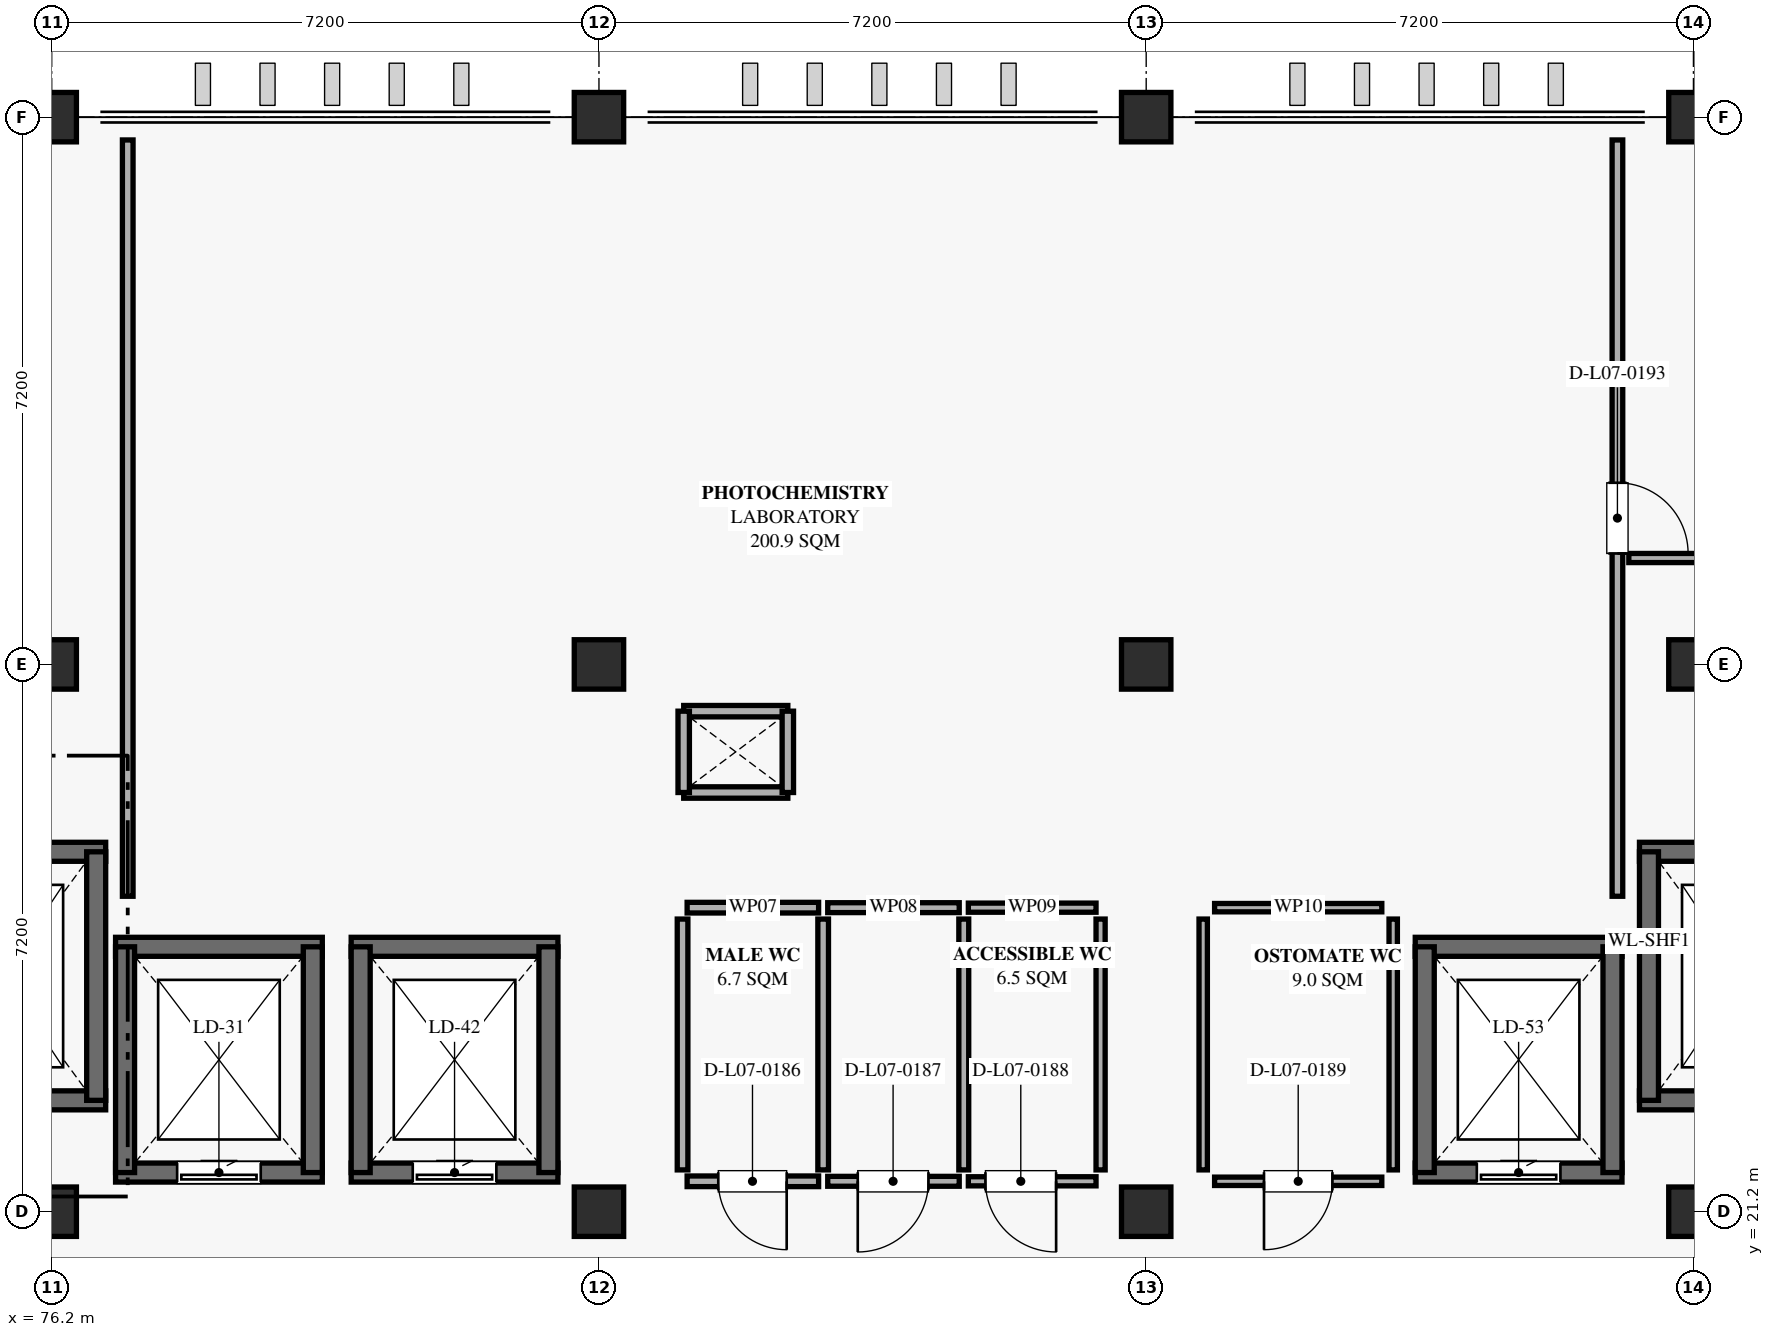
"""IFC4 building model, lengths in metres.
Left out: names, types, materials, properties, quantities, classifications, styles, units other than length and angle.
Written with IfcOpenShell. Run it as: python <this file> out.ifc"""

import sys

from ifc_helpers import new_model, si_unit, direction, frame, frame_2d, origin, origin_2d, place, context, subcontext, project, spatial, rectangle, extrude, element, fill, save


model = new_model("IFC4")
c1 = context("Model", 3, precision=1e-05, world=origin(), true_north=direction((0.0, 1.0)))
c2 = subcontext(c1, "Body", "Model", "MODEL_VIEW")
j1 = project(units=[si_unit("LENGTHUNIT", "METRE"), si_unit("PLANEANGLEUNIT", "RADIAN")], contexts=[c1])
p1 = place(None, origin())
s1 = spatial("IfcSite", under=j1, at=p1, CompositionType="ELEMENT")
p2 = place(p1, origin())
s2 = spatial("IfcBuilding", under=s1, at=p2, CompositionType="ELEMENT")
p3 = place(p2, frame((0.0, 0.0, 33.3)))
s3 = spatial("IfcBuildingStorey", under=s2, at=p3, CompositionType="ELEMENT", Elevation=33.3)
for number, where, z_axis, x_axis in (
    (1, (76.2, 21.2, 0.0), (0.0, 0.0, 1.0), (1.0, 0.0, 0.0)),
    (2, (83.4, 21.2, 0.0), (0.0, 0.0, 1.0), (1.0, 0.0, 0.0)),
    (3, (90.6, 21.2, 0.0), (0.0, 0.0, 1.0), (1.0, 0.0, 0.0)),
    (4, (97.8, 21.2, 0.0), (0.0, 0.0, 1.0), (1.0, 0.0, 0.0)),
    (5, (76.2, 28.4, 0.0), (0.0, 0.0, 1.0), (1.0, 0.0, 0.0)),
    (6, (83.4, 28.4, 0.0), (0.0, 0.0, 1.0), (1.0, 0.0, 0.0)),
    (7, (90.6, 28.4, 0.0), (0.0, 0.0, 1.0), (1.0, 0.0, 0.0)),
    (8, (97.8, 28.4, 0.0), (0.0, 0.0, 1.0), (1.0, 0.0, 0.0)),
    (9, (76.2, 35.6, 0.0), (0.0, 0.0, 1.0), (1.0, 0.0, 0.0)),
    (10, (83.4, 35.6, 0.0), (0.0, 0.0, 1.0), (1.0, 0.0, 0.0)),
    (11, (90.6, 35.6, 0.0), (0.0, 0.0, 1.0), (1.0, 0.0, 0.0)),
    (12, (97.8, 35.6, 0.0), (0.0, 0.0, 1.0), (1.0, 0.0, 0.0)),
):
    element("IfcColumn", number, at=place(p3, frame(where, z_axis=z_axis, x_axis=x_axis)), inside=s3, PredefinedType="COLUMN", context=c2, shape_type="SweptSolid", body=[
        extrude(rectangle(XDim=0.65, YDim=0.65, at=origin_2d()), origin(), (0.0, 0.0, 1.0), 4.32),
    ])
for number, where, z_axis, x_axis in (
    (13, (85.885, 26.715, 0.0), (0.0, 0.0, 1.0), (-1.0, 0.0, 0.0)),
    (14, (84.515, 27.785, 0.0), (0.0, 0.0, 1.0), (1.0, 0.0, 0.0)),
):
    element("IfcWall", number, at=place(p3, frame(where, z_axis=z_axis, x_axis=x_axis)), inside=s3, PredefinedType="PARTITIONING", context=c2, shape_type="SweptSolid", body=[
        extrude(rectangle(XDim=1.37, YDim=0.15, at=frame_2d((0.685, 0.0))), origin(), (0.0, 0.0, 1.0), 2.8),
    ])
for number, where, z_axis, x_axis in (
    (15, (84.515, 26.715, 0.0), (0.0, 0.0, 1.0), (0.0, 1.0, 0.0)),
    (16, (85.885, 27.785, 0.0), (0.0, 0.0, 1.0), (0.0, -1.0, 0.0)),
):
    element("IfcWall", number, at=place(p3, frame(where, z_axis=z_axis, x_axis=x_axis)), inside=s3, PredefinedType="PARTITIONING", context=c2, shape_type="SweptSolid", body=[
        extrude(rectangle(XDim=1.07, YDim=0.15, at=frame_2d((0.535, 0.0))), origin(), (0.0, 0.0, 1.0), 2.8),
    ])
for number, where, z_axis, x_axis in (
    (17, (76.91, 22.665, 0.0), (0.0, 0.0, 1.0), (-1.0, 0.0, 0.0)),
    (18, (74.19, 25.935, 0.0), (0.0, 0.0, 1.0), (1.0, 0.0, 0.0)),
):
    element("IfcWall", number, at=place(p3, frame(where, z_axis=z_axis, x_axis=x_axis)), inside=s3, PredefinedType="SHEAR", context=c2, shape_type="SweptSolid", body=[
        extrude(rectangle(XDim=2.72, YDim=0.25, at=frame_2d((1.36, 0.0))), origin(), (0.0, 0.0, 1.0), 4.05),
    ])
p4 = place(p3, frame((76.785, 25.935, 0.0), z_axis=(0.0, 0.0, 1.0), x_axis=(0.0, -1.0, 0.0)))
e19 = element("IfcWall", 19, at=p4, inside=s3, PredefinedType="SHEAR", context=c2, shape_type="SweptSolid", body=[
    extrude(rectangle(XDim=3.27, YDim=0.25, at=frame_2d((1.635, 0.0))), origin(), (0.0, 0.0, 1.0), 4.05),
])
for number, where, z_axis, x_axis in (
    (20, (99.81, 22.665, 0.0), (0.0, 0.0, 1.0), (-1.0, 0.0, 0.0)),
    (21, (97.09, 25.935, 0.0), (0.0, 0.0, 1.0), (1.0, 0.0, 0.0)),
):
    element("IfcWall", number, at=place(p3, frame(where, z_axis=z_axis, x_axis=x_axis)), inside=s3, PredefinedType="SHEAR", context=c2, shape_type="SweptSolid", body=[
        extrude(rectangle(XDim=2.72, YDim=0.25, at=frame_2d((1.36, 0.0))), origin(), (0.0, 0.0, 1.0), 4.05),
    ])
p5 = place(p3, frame((97.215, 22.665, 0.0), z_axis=(0.0, 0.0, 1.0), x_axis=(0.0, 1.0, 0.0)))
e22 = element("IfcWall", 22, at=p5, inside=s3, PredefinedType="SHEAR", context=c2, shape_type="SweptSolid", body=[
    extrude(rectangle(XDim=3.27, YDim=0.25, at=frame_2d((1.635, 0.0))), origin(), (0.0, 0.0, 1.0), 4.05),
])
p6 = place(p3, frame((79.76, 21.715, 0.0), z_axis=(0.0, 0.0, 1.0), x_axis=(-1.0, 0.0, 0.0)))
e23 = element("IfcWall", 23, at=p6, inside=s3, PredefinedType="SHEAR", context=c2, shape_type="SweptSolid", body=[
    extrude(rectangle(XDim=2.72, YDim=0.25, at=frame_2d((1.36, 0.0))), origin(), (0.0, 0.0, 1.0), 4.05),
])
p7 = place(p6, frame((0.81, 0.0, 0.0)))
e24 = element("IfcOpeningElement", 24, at=p7, cuts=e23, PredefinedType="OPENING", context=c2, shape_type="SweptSolid", body=[
    extrude(rectangle(XDim=1.1, YDim=2.2, at=frame_2d((0.55, 1.1))), frame((0.0, 0.135, 0.0), z_axis=(0.0, -1.0, 0.0), x_axis=(1.0, 0.0, 0.0)), (0.0, 0.0, 1.0), 0.27),
])
p8 = place(p3, frame((77.04, 24.685, 0.0), z_axis=(0.0, 0.0, 1.0), x_axis=(1.0, 0.0, 0.0)))
e25 = element("IfcWall", 25, at=p8, inside=s3, PredefinedType="SHEAR", context=c2, shape_type="SweptSolid", body=[
    extrude(rectangle(XDim=2.72, YDim=0.25, at=frame_2d((1.36, 0.0))), origin(), (0.0, 0.0, 1.0), 4.05),
])
for number, where, z_axis, x_axis in (
    (26, (77.165, 21.715, 0.0), (0.0, 0.0, 1.0), (0.0, 1.0, 0.0)),
    (27, (79.635, 24.685, 0.0), (0.0, 0.0, 1.0), (0.0, -1.0, 0.0)),
):
    element("IfcWall", number, at=place(p3, frame(where, z_axis=z_axis, x_axis=x_axis)), inside=s3, PredefinedType="SHEAR", context=c2, shape_type="SweptSolid", body=[
        extrude(rectangle(XDim=2.97, YDim=0.25, at=frame_2d((1.485, 0.0))), origin(), (0.0, 0.0, 1.0), 4.05),
    ])
p9 = place(p3, frame((82.86, 21.715, 0.0), z_axis=(0.0, 0.0, 1.0), x_axis=(-1.0, 0.0, 0.0)))
e28 = element("IfcWall", 28, at=p9, inside=s3, PredefinedType="SHEAR", context=c2, shape_type="SweptSolid", body=[
    extrude(rectangle(XDim=2.72, YDim=0.25, at=frame_2d((1.36, 0.0))), origin(), (0.0, 0.0, 1.0), 4.05),
])
p10 = place(p9, frame((0.81, 0.0, 0.0)))
e29 = element("IfcOpeningElement", 29, at=p10, cuts=e28, PredefinedType="OPENING", context=c2, shape_type="SweptSolid", body=[
    extrude(rectangle(XDim=1.1, YDim=2.2, at=frame_2d((0.55, 1.1))), frame((0.0, 0.135, 0.0), z_axis=(0.0, -1.0, 0.0), x_axis=(1.0, 0.0, 0.0)), (0.0, 0.0, 1.0), 0.27),
])
p11 = place(p3, frame((80.14, 24.685, 0.0), z_axis=(0.0, 0.0, 1.0), x_axis=(1.0, 0.0, 0.0)))
e30 = element("IfcWall", 30, at=p11, inside=s3, PredefinedType="SHEAR", context=c2, shape_type="SweptSolid", body=[
    extrude(rectangle(XDim=2.72, YDim=0.25, at=frame_2d((1.36, 0.0))), origin(), (0.0, 0.0, 1.0), 4.05),
])
for number, where, z_axis, x_axis in (
    (31, (80.265, 21.715, 0.0), (0.0, 0.0, 1.0), (0.0, 1.0, 0.0)),
    (32, (82.735, 24.685, 0.0), (0.0, 0.0, 1.0), (0.0, -1.0, 0.0)),
):
    element("IfcWall", number, at=place(p3, frame(where, z_axis=z_axis, x_axis=x_axis)), inside=s3, PredefinedType="SHEAR", context=c2, shape_type="SweptSolid", body=[
        extrude(rectangle(XDim=2.97, YDim=0.25, at=frame_2d((1.485, 0.0))), origin(), (0.0, 0.0, 1.0), 4.05),
    ])
p12 = place(p3, frame((96.86, 21.715, 0.0), z_axis=(0.0, 0.0, 1.0), x_axis=(-1.0, 0.0, 0.0)))
e33 = element("IfcWall", 33, at=p12, inside=s3, PredefinedType="SHEAR", context=c2, shape_type="SweptSolid", body=[
    extrude(rectangle(XDim=2.72, YDim=0.25, at=frame_2d((1.36, 0.0))), origin(), (0.0, 0.0, 1.0), 4.05),
])
p13 = place(p12, frame((0.81, 0.0, 0.0)))
e34 = element("IfcOpeningElement", 34, at=p13, cuts=e33, PredefinedType="OPENING", context=c2, shape_type="SweptSolid", body=[
    extrude(rectangle(XDim=1.1, YDim=2.2, at=frame_2d((0.55, 1.1))), frame((0.0, 0.135, 0.0), z_axis=(0.0, -1.0, 0.0), x_axis=(1.0, 0.0, 0.0)), (0.0, 0.0, 1.0), 0.27),
])
p14 = place(p3, frame((94.14, 24.685, 0.0), z_axis=(0.0, 0.0, 1.0), x_axis=(1.0, 0.0, 0.0)))
e35 = element("IfcWall", 35, at=p14, inside=s3, PredefinedType="SHEAR", context=c2, shape_type="SweptSolid", body=[
    extrude(rectangle(XDim=2.72, YDim=0.25, at=frame_2d((1.36, 0.0))), origin(), (0.0, 0.0, 1.0), 4.05),
])
for number, where, z_axis, x_axis in (
    (36, (94.265, 21.715, 0.0), (0.0, 0.0, 1.0), (0.0, 1.0, 0.0)),
    (37, (96.735, 24.685, 0.0), (0.0, 0.0, 1.0), (0.0, -1.0, 0.0)),
):
    element("IfcWall", number, at=place(p3, frame(where, z_axis=z_axis, x_axis=x_axis)), inside=s3, PredefinedType="SHEAR", context=c2, shape_type="SweptSolid", body=[
        extrude(rectangle(XDim=2.97, YDim=0.25, at=frame_2d((1.485, 0.0))), origin(), (0.0, 0.0, 1.0), 4.05),
    ])
p15 = place(p3, frame((86.29, 21.6, 0.0), z_axis=(0.0, 0.0, 1.0), x_axis=(-1.0, 0.0, 0.0)))
e38 = element("IfcWall", 38, at=p15, inside=s3, PredefinedType="PARTITIONING", context=c2, shape_type="SweptSolid", body=[
    extrude(rectangle(XDim=1.73, YDim=0.14, at=frame_2d((0.865, 0.0))), origin(), (0.0, 0.0, 1.0), 2.8),
])
p16 = place(p15, frame((0.42, 0.0, 0.0)))
e39 = element("IfcOpeningElement", 39, at=p16, cuts=e38, PredefinedType="OPENING", context=c2, shape_type="SweptSolid", body=[
    extrude(rectangle(XDim=0.9, YDim=2.22, at=frame_2d((0.45, 1.11))), frame((0.0, 0.08, 0.0), z_axis=(0.0, -1.0, 0.0), x_axis=(1.0, 0.0, 0.0)), (0.0, 0.0, 1.0), 0.16),
])
p17 = place(p3, frame((84.56, 25.2, 0.0), z_axis=(0.0, 0.0, 1.0), x_axis=(1.0, 0.0, 0.0)))
e40 = element("IfcWall", 40, at=p17, inside=s3, PredefinedType="PARTITIONING", context=c2, shape_type="SweptSolid", body=[
    extrude(rectangle(XDim=1.73, YDim=0.14, at=frame_2d((0.865, 0.0))), origin(), (0.0, 0.0, 1.0), 2.8),
])
for number, where, z_axis, x_axis in (
    (41, (84.5, 21.75, 0.0), (0.0, 0.0, 1.0), (0.0, 1.0, 0.0)),
    (42, (86.35, 25.05, 0.0), (0.0, 0.0, 1.0), (0.0, -1.0, 0.0)),
):
    element("IfcWall", number, at=place(p3, frame(where, z_axis=z_axis, x_axis=x_axis)), inside=s3, PredefinedType="PARTITIONING", context=c2, shape_type="SweptSolid", body=[
        extrude(rectangle(XDim=3.3, YDim=0.14, at=frame_2d((1.65, 0.0))), origin(), (0.0, 0.0, 1.0), 2.8),
    ])
p18 = place(p3, frame((88.14, 21.6, 0.0), z_axis=(0.0, 0.0, 1.0), x_axis=(-1.0, 0.0, 0.0)))
e43 = element("IfcWall", 43, at=p18, inside=s3, PredefinedType="PARTITIONING", context=c2, shape_type="SweptSolid", body=[
    extrude(rectangle(XDim=1.73, YDim=0.13, at=frame_2d((0.865, 0.0))), origin(), (0.0, 0.0, 1.0), 2.8),
])
p19 = place(p18, frame((0.405, 0.0, 0.0)))
e44 = element("IfcOpeningElement", 44, at=p19, cuts=e43, PredefinedType="OPENING", context=c2, shape_type="SweptSolid", body=[
    extrude(rectangle(XDim=0.93, YDim=2.05, at=frame_2d((0.465, 1.025))), frame((0.0, 0.075, 0.0), z_axis=(0.0, -1.0, 0.0), x_axis=(1.0, 0.0, 0.0)), (0.0, 0.0, 1.0), 0.15),
])
p20 = place(p3, frame((86.41, 25.2, 0.0), z_axis=(0.0, 0.0, 1.0), x_axis=(1.0, 0.0, 0.0)))
e45 = element("IfcWall", 45, at=p20, inside=s3, PredefinedType="PARTITIONING", context=c2, shape_type="SweptSolid", body=[
    extrude(rectangle(XDim=1.73, YDim=0.13, at=frame_2d((0.865, 0.0))), origin(), (0.0, 0.0, 1.0), 2.8),
])
p21 = place(p3, frame((88.2, 25.05, 0.0), z_axis=(0.0, 0.0, 1.0), x_axis=(0.0, -1.0, 0.0)))
e46 = element("IfcWall", 46, at=p21, inside=s3, PredefinedType="PARTITIONING", context=c2, shape_type="SweptSolid", body=[
    extrude(rectangle(XDim=3.3, YDim=0.13, at=frame_2d((1.65, 0.0))), origin(), (0.0, 0.0, 1.0), 2.8),
])
p22 = place(p3, frame((89.94, 21.6, 0.0), z_axis=(0.0, 0.0, 1.0), x_axis=(-1.0, 0.0, 0.0)))
e47 = element("IfcWall", 47, at=p22, inside=s3, PredefinedType="PARTITIONING", context=c2, shape_type="SweptSolid", body=[
    extrude(rectangle(XDim=1.68, YDim=0.12, at=frame_2d((0.84, 0.0))), origin(), (0.0, 0.0, 1.0), 2.8),
])
p23 = place(p22, frame((0.525, 0.0, 0.0)))
e48 = element("IfcOpeningElement", 48, at=p23, cuts=e47, PredefinedType="OPENING", context=c2, shape_type="SweptSolid", body=[
    extrude(rectangle(XDim=0.93, YDim=2.1, at=frame_2d((0.465, 1.05))), frame((0.0, 0.07, 0.0), z_axis=(0.0, -1.0, 0.0), x_axis=(1.0, 0.0, 0.0)), (0.0, 0.0, 1.0), 0.14),
])
p24 = place(p3, frame((88.26, 25.2, 0.0), z_axis=(0.0, 0.0, 1.0), x_axis=(1.0, 0.0, 0.0)))
e49 = element("IfcWall", 49, at=p24, inside=s3, PredefinedType="PARTITIONING", context=c2, shape_type="SweptSolid", body=[
    extrude(rectangle(XDim=1.68, YDim=0.12, at=frame_2d((0.84, 0.0))), origin(), (0.0, 0.0, 1.0), 2.8),
])
p25 = place(p3, frame((90.0, 25.05, 0.0), z_axis=(0.0, 0.0, 1.0), x_axis=(0.0, -1.0, 0.0)))
e50 = element("IfcWall", 50, at=p25, inside=s3, PredefinedType="PARTITIONING", context=c2, shape_type="SweptSolid", body=[
    extrude(rectangle(XDim=3.3, YDim=0.12, at=frame_2d((1.65, 0.0))), origin(), (0.0, 0.0, 1.0), 2.8),
])
p26 = place(p3, frame((93.7, 21.6, 0.0), z_axis=(0.0, 0.0, 1.0), x_axis=(-1.0, 0.0, 0.0)))
e51 = element("IfcWall", 51, at=p26, inside=s3, PredefinedType="PARTITIONING", context=c2, shape_type="SweptSolid", body=[
    extrude(rectangle(XDim=2.2, YDim=0.11, at=frame_2d((1.1, 0.0))), origin(), (0.0, 0.0, 1.0), 2.8),
])
p27 = place(p26, frame((0.65, 0.0, 0.0)))
e52 = element("IfcOpeningElement", 52, at=p27, cuts=e51, PredefinedType="OPENING", context=c2, shape_type="SweptSolid", body=[
    extrude(rectangle(XDim=0.9, YDim=2.16, at=frame_2d((0.45, 1.08))), frame((0.0, 0.065, 0.0), z_axis=(0.0, -1.0, 0.0), x_axis=(1.0, 0.0, 0.0)), (0.0, 0.0, 1.0), 0.13),
])
p28 = place(p3, frame((91.5, 25.2, 0.0), z_axis=(0.0, 0.0, 1.0), x_axis=(1.0, 0.0, 0.0)))
e53 = element("IfcWall", 53, at=p28, inside=s3, PredefinedType="PARTITIONING", context=c2, shape_type="SweptSolid", body=[
    extrude(rectangle(XDim=2.2, YDim=0.11, at=frame_2d((1.1, 0.0))), origin(), (0.0, 0.0, 1.0), 2.8),
])
for number, where, z_axis, x_axis in (
    (54, (91.35, 21.75, 0.0), (0.0, 0.0, 1.0), (0.0, 1.0, 0.0)),
    (55, (93.85, 25.05, 0.0), (0.0, 0.0, 1.0), (0.0, -1.0, 0.0)),
):
    element("IfcWall", number, at=place(p3, frame(where, z_axis=z_axis, x_axis=x_axis)), inside=s3, PredefinedType="PARTITIONING", context=c2, shape_type="SweptSolid", body=[
        extrude(rectangle(XDim=3.3, YDim=0.11, at=frame_2d((1.65, 0.0))), origin(), (0.0, 0.0, 1.0), 2.8),
    ])
p29 = place(p3, frame((77.2, 25.35, 0.0), z_axis=(0.0, 0.0, 1.0), x_axis=(0.0, 1.0, 0.0)))
e56 = element("IfcWall", 56, at=p29, inside=s3, PredefinedType="PARTITIONING", context=c2, shape_type="SweptSolid", body=[
    extrude(rectangle(XDim=9.95, YDim=0.14, at=frame_2d((4.975, 0.0))), origin(), (0.0, 0.0, 1.0), 2.8),
])
p30 = place(p3, frame((96.8, 35.3, 0.0), z_axis=(0.0, 0.0, 1.0), x_axis=(0.0, -1.0, 0.0)))
e57 = element("IfcWall", 57, at=p30, inside=s3, PredefinedType="PARTITIONING", context=c2, shape_type="SweptSolid", body=[
    extrude(rectangle(XDim=9.95, YDim=0.14, at=frame_2d((4.975, 0.0))), origin(), (0.0, 0.0, 1.0), 2.8),
])
p31 = place(p30, frame((4.51, 0.0, 0.0)))
e58 = element("IfcOpeningElement", 58, at=p31, cuts=e57, PredefinedType="OPENING", context=c2, shape_type="SweptSolid", body=[
    extrude(rectangle(XDim=0.93, YDim=2.16, at=frame_2d((0.465, 1.08))), frame((0.0, 0.08, 0.0), z_axis=(0.0, -1.0, 0.0), x_axis=(1.0, 0.0, 0.0)), (0.0, 0.0, 1.0), 0.16),
])
p32 = place(p3, frame((111.03, 29.8, 0.0), z_axis=(0.0, 0.0, 1.0), x_axis=(-1.0, 0.0, 0.0)))
e59 = element("IfcWall", 59, at=p32, inside=s3, PredefinedType="PARTITIONING", context=c2, shape_type="SweptSolid", body=[
    extrude(rectangle(XDim=14.08, YDim=0.12, at=frame_2d((7.04, 0.0))), origin(), (0.0, 0.0, 1.0), 2.8),
])
p33 = place(p32, frame((9.165, 0.0, 0.0)))
e60 = element("IfcOpeningElement", 60, at=p33, cuts=e59, PredefinedType="OPENING", context=c2, shape_type="SweptSolid", body=[
    extrude(rectangle(XDim=0.93, YDim=2.22, at=frame_2d((0.465, 1.11))), frame((0.0, 0.07, 0.0), z_axis=(0.0, -1.0, 0.0), x_axis=(1.0, 0.0, 0.0)), (0.0, 0.0, 1.0), 0.14),
])
p34 = place(p7, origin())
e61 = element("IfcDoor", 61, at=p34, inside=s3, OperationType="SLIDING_TO_LEFT", PredefinedType="DOOR", context=c2, shape_type="SweptSolid", body=[
    extrude(rectangle(XDim=1.1, YDim=2.2, at=frame_2d((0.55, 1.1))), frame((0.0, 0.025, 0.0), z_axis=(0.0, -1.0, 0.0), x_axis=(1.0, 0.0, 0.0)), (0.0, 0.0, 1.0), 0.05),
])
fill(e24, e61)
p35 = place(p10, origin())
e62 = element("IfcDoor", 62, at=p35, inside=s3, OperationType="SLIDING_TO_LEFT", PredefinedType="DOOR", context=c2, shape_type="SweptSolid", body=[
    extrude(rectangle(XDim=1.1, YDim=2.2, at=frame_2d((0.55, 1.1))), frame((0.0, 0.025, 0.0), z_axis=(0.0, -1.0, 0.0), x_axis=(1.0, 0.0, 0.0)), (0.0, 0.0, 1.0), 0.05),
])
fill(e29, e62)
p36 = place(p13, origin())
e63 = element("IfcDoor", 63, at=p36, inside=s3, OperationType="SLIDING_TO_LEFT", PredefinedType="DOOR", context=c2, shape_type="SweptSolid", body=[
    extrude(rectangle(XDim=1.1, YDim=2.2, at=frame_2d((0.55, 1.1))), frame((0.0, 0.025, 0.0), z_axis=(0.0, -1.0, 0.0), x_axis=(1.0, 0.0, 0.0)), (0.0, 0.0, 1.0), 0.05),
])
fill(e34, e63)
p37 = place(p16, origin())
e64 = element("IfcDoor", 64, at=p37, inside=s3, OperationType="SINGLE_SWING_LEFT", PredefinedType="DOOR", context=c2, shape_type="SweptSolid", body=[
    extrude(rectangle(XDim=0.9, YDim=2.22, at=frame_2d((0.45, 1.11))), frame((0.0, 0.025, 0.0), z_axis=(0.0, -1.0, 0.0), x_axis=(1.0, 0.0, 0.0)), (0.0, 0.0, 1.0), 0.05),
])
fill(e39, e64)
p38 = place(p19, origin())
e65 = element("IfcDoor", 65, at=p38, inside=s3, OperationType="SINGLE_SWING_RIGHT", PredefinedType="DOOR", context=c2, shape_type="SweptSolid", body=[
    extrude(rectangle(XDim=0.93, YDim=2.05, at=frame_2d((0.465, 1.025))), frame((0.0, 0.025, 0.0), z_axis=(0.0, -1.0, 0.0), x_axis=(1.0, 0.0, 0.0)), (0.0, 0.0, 1.0), 0.05),
])
fill(e44, e65)
p39 = place(p23, origin())
e66 = element("IfcDoor", 66, at=p39, inside=s3, OperationType="SINGLE_SWING_LEFT", PredefinedType="DOOR", context=c2, shape_type="SweptSolid", body=[
    extrude(rectangle(XDim=0.93, YDim=2.1, at=frame_2d((0.465, 1.05))), frame((0.0, 0.025, 0.0), z_axis=(0.0, -1.0, 0.0), x_axis=(1.0, 0.0, 0.0)), (0.0, 0.0, 1.0), 0.05),
])
fill(e48, e66)
p40 = place(p27, origin())
e67 = element("IfcDoor", 67, at=p40, inside=s3, OperationType="SINGLE_SWING_RIGHT", PredefinedType="DOOR", context=c2, shape_type="SweptSolid", body=[
    extrude(rectangle(XDim=0.9, YDim=2.16, at=frame_2d((0.45, 1.08))), frame((0.0, 0.025, 0.0), z_axis=(0.0, -1.0, 0.0), x_axis=(1.0, 0.0, 0.0)), (0.0, 0.0, 1.0), 0.05),
])
fill(e52, e67)
p41 = place(p31, origin())
e68 = element("IfcDoor", 68, at=p41, inside=s3, OperationType="SINGLE_SWING_RIGHT", PredefinedType="DOOR", context=c2, shape_type="SweptSolid", body=[
    extrude(rectangle(XDim=0.93, YDim=2.16, at=frame_2d((0.465, 1.08))), frame((0.0, 0.025, 0.0), z_axis=(0.0, -1.0, 0.0), x_axis=(1.0, 0.0, 0.0)), (0.0, 0.0, 1.0), 0.05),
])
fill(e58, e68)
save(model, sys.argv[1])
